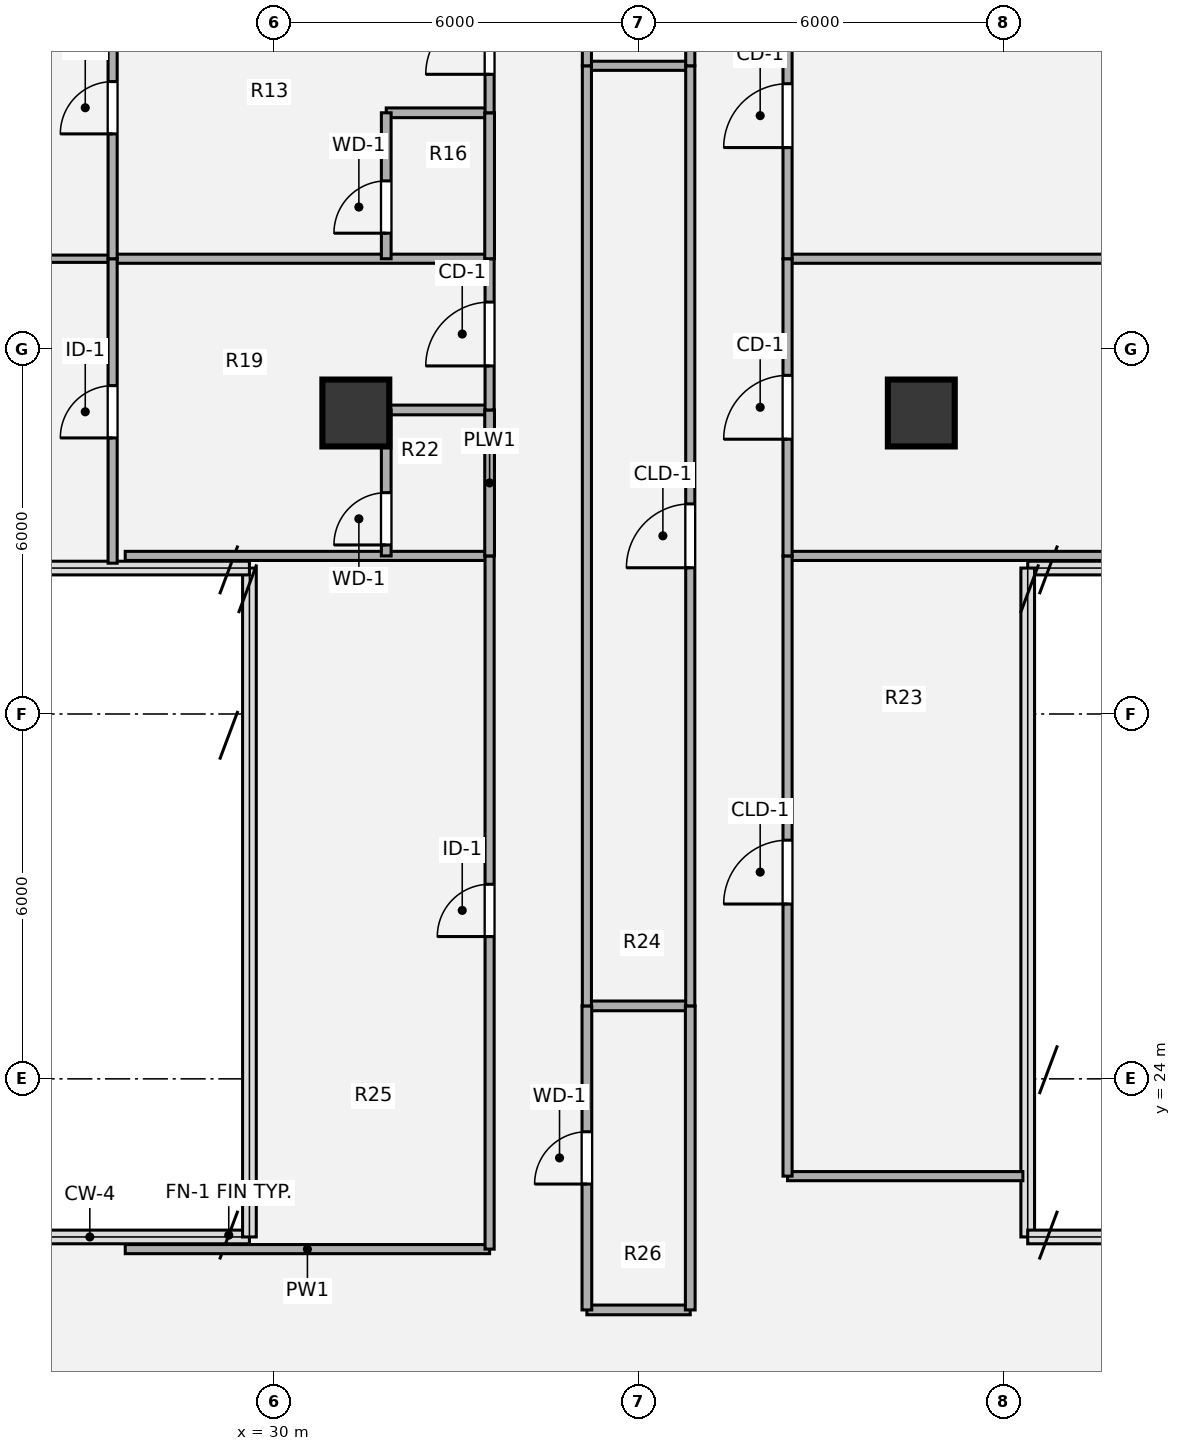
"""IFC4 building model, lengths in metres.
Left out: names, types, materials, properties, quantities, classifications, styles, units other than length and angle.
Written with IfcOpenShell. Run it as: python <this file> out.ifc"""

import sys

from ifc_helpers import new_model, si_unit, direction, frame, frame_2d, origin, origin_2d, place, context, subcontext, project, spatial, rectangle, hollow_circle, extrude, source, transform, mapped, element, fill, save


model = new_model("IFC4")
c1 = context("Model", 3, precision=1e-05, world=origin(), true_north=direction((0.0, 1.0)))
c2 = subcontext(c1, "Body", "Model", "MODEL_VIEW")
j1 = project(units=[si_unit("LENGTHUNIT", "METRE"), si_unit("PLANEANGLEUNIT", "RADIAN")], contexts=[c1])
p1 = place(None, origin())
s1 = spatial("IfcSite", under=j1, at=p1, CompositionType="ELEMENT")
p2 = place(p1, origin())
s2 = spatial("IfcBuilding", under=s1, at=p2, CompositionType="ELEMENT")
p3 = place(p2, frame((0.0, 0.0, 198.0)))
s3 = spatial("IfcBuildingStorey", under=s2, at=p3, CompositionType="ELEMENT", Elevation=198.0)
m1 = source(origin(), c2, "Body", "SweptSolid", [
    extrude(hollow_circle(Radius=0.55, WallThickness=0.04, at=origin_2d()), origin(), (0.0, 0.0, 1.0), 3.78),
])
for number, where, z_axis, x_axis in (
    (1, (31.35, 34.95, 0.0), (0.0, 0.0, 1.0), (1.0, 0.0, 0.0)),
    (2, (40.65, 34.95, 0.0), (0.0, 0.0, 1.0), (1.0, 0.0, 0.0)),
):
    element("IfcColumn", number, at=place(p3, frame(where, z_axis=z_axis, x_axis=x_axis)), inside=s3, PredefinedType="COLUMN", context=c2, shape_type="MappedRepresentation", body=[
        mapped(m1, transform((0.0, 0.0, 0.0), x_axis=(1.0, 0.0, 0.0), y_axis=(0.0, 1.0, 0.0), z_axis=(0.0, 0.0, 1.0), scale=1.0)),
    ])
p4 = place(p3, frame((35.15, 20.2, 0.0), z_axis=(0.0, 0.0, 1.0), x_axis=(1.0, 0.0, 0.0)))
e3 = element("IfcWall", 3, at=p4, inside=s3, PredefinedType="PLUMBINGWALL", context=c2, shape_type="SweptSolid", body=[
    extrude(rectangle(XDim=1.7, YDim=0.16, at=frame_2d((0.85, 0.0))), origin(), (0.0, 0.0, 1.0), 3.5),
])
p5 = place(p3, frame((27.558, 21.2, 0.0), z_axis=(0.0, 0.0, 1.0), x_axis=(1.0, 0.0, 0.0)))
e4 = element("IfcWall", 4, at=p5, inside=s3, PredefinedType="PARTITIONING", context=c2, shape_type="SweptSolid", body=[
    extrude(rectangle(XDim=5.992, YDim=0.15, at=frame_2d((2.996, 0.0))), origin(), (0.0, 0.0, 1.0), 3.5),
])
p6 = place(p3, frame((38.45, 22.4, 0.0), z_axis=(0.0, 0.0, 1.0), x_axis=(1.0, 0.0, 0.0)))
e5 = element("IfcWall", 5, at=p6, inside=s3, PredefinedType="PARTITIONING", context=c2, shape_type="SweptSolid", body=[
    extrude(rectangle(XDim=3.87, YDim=0.15, at=frame_2d((1.935, 0.0))), origin(), (0.0, 0.0, 1.0), 3.5),
])
p7 = place(p3, frame((35.15, 25.2, 0.0), z_axis=(0.0, 0.0, 1.0), x_axis=(1.0, 0.0, 0.0)))
e6 = element("IfcWall", 6, at=p7, inside=s3, PredefinedType="PLUMBINGWALL", context=c2, shape_type="SweptSolid", body=[
    extrude(rectangle(XDim=1.7, YDim=0.16, at=frame_2d((0.85, 0.0))), origin(), (0.0, 0.0, 1.0), 3.5),
])
p8 = place(p3, frame((27.557, 32.6, 0.0), z_axis=(0.0, 0.0, 1.0), x_axis=(1.0, 0.0, 0.0)))
e7 = element("IfcWall", 7, at=p8, inside=s3, PredefinedType="PARTITIONING", context=c2, shape_type="SweptSolid", body=[
    extrude(rectangle(XDim=5.993, YDim=0.15, at=frame_2d((2.997, 0.0))), origin(), (0.0, 0.0, 1.0), 3.5),
])
p9 = place(p3, frame((38.45, 32.6, 0.0), z_axis=(0.0, 0.0, 1.0), x_axis=(1.0, 0.0, 0.0)))
e8 = element("IfcWall", 8, at=p9, inside=s3, PredefinedType="PARTITIONING", context=c2, shape_type="SweptSolid", body=[
    extrude(rectangle(XDim=5.993, YDim=0.15, at=frame_2d((2.997, 0.0))), origin(), (0.0, 0.0, 1.0), 3.5),
])
p10 = place(p3, frame((31.85, 35.0, 0.0), z_axis=(0.0, 0.0, 1.0), x_axis=(1.0, 0.0, 0.0)))
e9 = element("IfcWall", 9, at=p10, inside=s3, PredefinedType="PLUMBINGWALL", context=c2, shape_type="SweptSolid", body=[
    extrude(rectangle(XDim=1.7, YDim=0.16, at=frame_2d((0.85, 0.0))), origin(), (0.0, 0.0, 1.0), 2.903),
])
p11 = place(p3, frame((15.88, 37.487, 0.0), z_axis=(0.0, 0.0, 1.0), x_axis=(1.0, 0.0, 0.0)))
e10 = element("IfcWall", 10, at=p11, inside=s3, PredefinedType="PARTITIONING", context=c2, shape_type="SweptSolid", body=[
    extrude(rectangle(XDim=11.47, YDim=0.12, at=frame_2d((5.735, 0.0))), origin(), (0.0, 0.0, 1.0), 3.055),
])
p12 = place(p3, frame((27.35, 37.487, 0.0), z_axis=(0.0, 0.0, 1.0), x_axis=(1.0, 0.0, 0.0)))
e11 = element("IfcWall", 11, at=p12, inside=s3, PredefinedType="PARTITIONING", context=c2, shape_type="SweptSolid", body=[
    extrude(rectangle(XDim=6.2, YDim=0.15, at=frame_2d((3.1, 0.0))), origin(), (0.0, 0.0, 1.0), 3.055),
])
p13 = place(p3, frame((38.45, 37.487, 0.0), z_axis=(0.0, 0.0, 1.0), x_axis=(1.0, 0.0, 0.0)))
e12 = element("IfcWall", 12, at=p13, inside=s3, PredefinedType="PARTITIONING", context=c2, shape_type="SweptSolid", body=[
    extrude(rectangle(XDim=17.67, YDim=0.15, at=frame_2d((8.835, 0.0))), origin(), (0.0, 0.0, 1.0), 3.055),
])
p14 = place(p3, frame((31.85, 39.887, 0.0), z_axis=(0.0, 0.0, 1.0), x_axis=(1.0, 0.0, 0.0)))
e13 = element("IfcWall", 13, at=p14, inside=s3, PredefinedType="PLUMBINGWALL", context=c2, shape_type="SweptSolid", body=[
    extrude(rectangle(XDim=1.7, YDim=0.16, at=frame_2d((0.85, 0.0))), origin(), (0.0, 0.0, 1.0), 3.259),
])
p15 = place(p3, frame((35.15, 40.66, 0.0), z_axis=(0.0, 0.0, 1.0), x_axis=(1.0, 0.0, 0.0)))
e14 = element("IfcWall", 14, at=p15, inside=s3, PredefinedType="PARTITIONING", context=c2, shape_type="SweptSolid", body=[
    extrude(rectangle(XDim=1.7, YDim=0.15, at=frame_2d((0.85, 0.0))), origin(), (0.0, 0.0, 1.0), 3.259),
])
p16 = place(p3, frame((27.35, 32.48, 0.0), z_axis=(0.0, 0.0, 1.0), x_axis=(0.0, 1.0, 0.0)))
e15 = element("IfcWall", 15, at=p16, inside=s3, PredefinedType="PARTITIONING", context=c2, shape_type="SweptSolid", body=[
    extrude(rectangle(XDim=5.007, YDim=0.15, at=frame_2d((2.503, 0.0))), origin(), (0.0, 0.0, 1.0), 3.5),
])
p17 = place(p16, frame((2.06, 0.0, 0.0)))
e16 = element("IfcOpeningElement", 16, at=p17, cuts=e15, PredefinedType="OPENING", context=c2, shape_type="SweptSolid", body=[
    extrude(rectangle(XDim=0.86, YDim=2.1, at=origin_2d()), frame((0.43, 0.085, 1.05), z_axis=(0.0, -1.0, 0.0), x_axis=(1.0, 0.0, 0.0)), (0.0, 0.0, 1.0), 0.17),
])
p18 = place(p3, frame((27.35, 37.487, 0.0), z_axis=(0.0, 0.0, 1.0), x_axis=(0.0, 1.0, 0.0)))
e17 = element("IfcWall", 17, at=p18, inside=s3, PredefinedType="PARTITIONING", context=c2, shape_type="SweptSolid", body=[
    extrude(rectangle(XDim=4.706, YDim=0.15, at=frame_2d((2.353, 0.0))), origin(), (0.0, 0.0, 1.0), 3.5),
])
p19 = place(p18, frame((2.053, 0.0, 0.0)))
e18 = element("IfcOpeningElement", 18, at=p19, cuts=e17, PredefinedType="OPENING", context=c2, shape_type="SweptSolid", body=[
    extrude(rectangle(XDim=0.86, YDim=2.1, at=origin_2d()), frame((0.43, 0.085, 1.05), z_axis=(0.0, -1.0, 0.0), x_axis=(1.0, 0.0, 0.0)), (0.0, 0.0, 1.0), 0.17),
])
p20 = place(p3, frame((31.85, 32.6, 0.0), z_axis=(0.0, 0.0, 1.0), x_axis=(0.0, 1.0, 0.0)))
e19 = element("IfcWall", 19, at=p20, inside=s3, PredefinedType="PLUMBINGWALL", context=c2, shape_type="SweptSolid", body=[
    extrude(rectangle(XDim=2.4, YDim=0.16, at=frame_2d((1.2, 0.0))), origin(), (0.0, 0.0, 1.0), 3.5),
])
p21 = place(p20, frame((0.18, 0.0, 0.0)))
e20 = element("IfcOpeningElement", 20, at=p21, cuts=e19, PredefinedType="OPENING", context=c2, shape_type="SweptSolid", body=[
    extrude(rectangle(XDim=0.86, YDim=2.1, at=origin_2d()), frame((0.43, 0.09, 1.05), z_axis=(0.0, -1.0, 0.0), x_axis=(1.0, 0.0, 0.0)), (0.0, 0.0, 1.0), 0.18),
])
p22 = place(p3, frame((31.85, 37.487, 0.0), z_axis=(0.0, 0.0, 1.0), x_axis=(0.0, 1.0, 0.0)))
e21 = element("IfcWall", 21, at=p22, inside=s3, PredefinedType="PLUMBINGWALL", context=c2, shape_type="SweptSolid", body=[
    extrude(rectangle(XDim=2.4, YDim=0.16, at=frame_2d((1.2, 0.0))), origin(), (0.0, 0.0, 1.0), 3.5),
])
p23 = place(p22, frame((0.42, 0.0, 0.0)))
e22 = element("IfcOpeningElement", 22, at=p23, cuts=e21, PredefinedType="OPENING", context=c2, shape_type="SweptSolid", body=[
    extrude(rectangle(XDim=0.86, YDim=2.1, at=origin_2d()), frame((0.43, 0.09, 1.05), z_axis=(0.0, -1.0, 0.0), x_axis=(1.0, 0.0, 0.0)), (0.0, 0.0, 1.0), 0.18),
])
p24 = place(p3, frame((33.55, 21.2, 0.0), z_axis=(0.0, 0.0, 1.0), x_axis=(0.0, 1.0, 0.0)))
e23 = element("IfcWall", 23, at=p24, inside=s3, PredefinedType="PARTITIONING", context=c2, shape_type="SweptSolid", body=[
    extrude(rectangle(XDim=11.4, YDim=0.15, at=frame_2d((5.7, 0.0))), origin(), (0.0, 0.0, 1.0), 3.5),
])
p25 = place(p24, frame((5.14, 0.0, 0.0)))
e24 = element("IfcOpeningElement", 24, at=p25, cuts=e23, PredefinedType="OPENING", context=c2, shape_type="SweptSolid", body=[
    extrude(rectangle(XDim=0.86, YDim=2.1, at=origin_2d()), frame((0.43, 0.085, 1.05), z_axis=(0.0, -1.0, 0.0), x_axis=(1.0, 0.0, 0.0)), (0.0, 0.0, 1.0), 0.17),
])
p26 = place(p3, frame((33.55, 32.6, 0.0), z_axis=(0.0, 0.0, 1.0), x_axis=(0.0, 1.0, 0.0)))
e25 = element("IfcWall", 25, at=p26, inside=s3, PredefinedType="PLUMBINGWALL", context=c2, shape_type="SweptSolid", body=[
    extrude(rectangle(XDim=2.4, YDim=0.16, at=frame_2d((1.2, 0.0))), origin(), (0.0, 0.0, 1.0), 3.5),
])
p27 = place(p3, frame((33.55, 35.0, 0.0), z_axis=(0.0, 0.0, 1.0), x_axis=(0.0, 1.0, 0.0)))
e26 = element("IfcWall", 26, at=p27, inside=s3, PredefinedType="PARTITIONING", context=c2, shape_type="SweptSolid", body=[
    extrude(rectangle(XDim=2.487, YDim=0.15, at=frame_2d((1.244, 0.0))), origin(), (0.0, 0.0, 1.0), 3.5),
])
p28 = place(p27, frame((0.724, 0.0, 0.0)))
e27 = element("IfcOpeningElement", 27, at=p28, cuts=e26, PredefinedType="OPENING", context=c2, shape_type="SweptSolid", body=[
    extrude(rectangle(XDim=1.05, YDim=2.1, at=origin_2d()), frame((0.525, 0.085, 1.05), z_axis=(0.0, -1.0, 0.0), x_axis=(1.0, 0.0, 0.0)), (0.0, 0.0, 1.0), 0.17),
])
p29 = place(p3, frame((33.55, 37.487, 0.0), z_axis=(0.0, 0.0, 1.0), x_axis=(0.0, 1.0, 0.0)))
e28 = element("IfcWall", 28, at=p29, inside=s3, PredefinedType="PLUMBINGWALL", context=c2, shape_type="SweptSolid", body=[
    extrude(rectangle(XDim=2.4, YDim=0.16, at=frame_2d((1.2, 0.0))), origin(), (0.0, 0.0, 1.0), 3.5),
])
p30 = place(p3, frame((33.55, 39.887, 0.0), z_axis=(0.0, 0.0, 1.0), x_axis=(0.0, 1.0, 0.0)))
e29 = element("IfcWall", 29, at=p30, inside=s3, PredefinedType="PARTITIONING", context=c2, shape_type="SweptSolid", body=[
    extrude(rectangle(XDim=2.306, YDim=0.15, at=frame_2d((1.153, 0.0))), origin(), (0.0, 0.0, 1.0), 3.5),
])
p31 = place(p30, frame((0.633, 0.0, 0.0)))
e30 = element("IfcOpeningElement", 30, at=p31, cuts=e29, PredefinedType="OPENING", context=c2, shape_type="SweptSolid", body=[
    extrude(rectangle(XDim=1.05, YDim=2.1, at=origin_2d()), frame((0.525, 0.085, 1.05), z_axis=(0.0, -1.0, 0.0), x_axis=(1.0, 0.0, 0.0)), (0.0, 0.0, 1.0), 0.17),
])
p32 = place(p3, frame((35.15, 20.2, 0.0), z_axis=(0.0, 0.0, 1.0), x_axis=(0.0, 1.0, 0.0)))
e31 = element("IfcWall", 31, at=p32, inside=s3, PredefinedType="PLUMBINGWALL", context=c2, shape_type="SweptSolid", body=[
    extrude(rectangle(XDim=5.0, YDim=0.16, at=frame_2d((2.5, 0.0))), origin(), (0.0, 0.0, 1.0), 3.5),
])
p33 = place(p32, frame((2.07, 0.0, 0.0)))
e32 = element("IfcOpeningElement", 32, at=p33, cuts=e31, PredefinedType="OPENING", context=c2, shape_type="SweptSolid", body=[
    extrude(rectangle(XDim=0.86, YDim=2.1, at=origin_2d()), frame((0.43, 0.09, 1.05), z_axis=(0.0, -1.0, 0.0), x_axis=(1.0, 0.0, 0.0)), (0.0, 0.0, 1.0), 0.18),
])
p34 = place(p3, frame((35.15, 25.2, 0.0), z_axis=(0.0, 0.0, 1.0), x_axis=(0.0, 1.0, 0.0)))
e33 = element("IfcWall", 33, at=p34, inside=s3, PredefinedType="PARTITIONING", context=c2, shape_type="SweptSolid", body=[
    extrude(rectangle(XDim=15.46, YDim=0.15, at=frame_2d((7.73, 0.0))), origin(), (0.0, 0.0, 1.0), 3.5),
])
p35 = place(p3, frame((35.15, 40.66, 0.0), z_axis=(0.0, 0.0, 1.0), x_axis=(0.0, 1.0, 0.0)))
e34 = element("IfcWall", 34, at=p35, inside=s3, PredefinedType="PARTITIONING", context=c2, shape_type="SweptSolid", body=[
    extrude(rectangle(XDim=10.54, YDim=0.15, at=frame_2d((5.27, 0.0))), origin(), (0.0, 0.0, 1.0), 3.5),
])
p36 = place(p35, frame((4.81, 0.0, 0.0)))
e35 = element("IfcOpeningElement", 35, at=p36, cuts=e34, PredefinedType="OPENING", context=c2, shape_type="SweptSolid", body=[
    extrude(rectangle(XDim=0.86, YDim=2.1, at=origin_2d()), frame((0.43, 0.085, 1.05), z_axis=(0.0, -1.0, 0.0), x_axis=(1.0, 0.0, 0.0)), (0.0, 0.0, 1.0), 0.17),
])
p37 = place(p3, frame((36.85, 20.2, 0.0), z_axis=(0.0, 0.0, 1.0), x_axis=(0.0, 1.0, 0.0)))
e36 = element("IfcWall", 36, at=p37, inside=s3, PredefinedType="PLUMBINGWALL", context=c2, shape_type="SweptSolid", body=[
    extrude(rectangle(XDim=5.0, YDim=0.16, at=frame_2d((2.5, 0.0))), origin(), (0.0, 0.0, 1.0), 3.5),
])
p38 = place(p3, frame((36.85, 25.2, 0.0), z_axis=(0.0, 0.0, 1.0), x_axis=(0.0, 1.0, 0.0)))
e37 = element("IfcWall", 37, at=p38, inside=s3, PredefinedType="PARTITIONING", context=c2, shape_type="SweptSolid", body=[
    extrude(rectangle(XDim=15.46, YDim=0.15, at=frame_2d((7.73, 0.0))), origin(), (0.0, 0.0, 1.0), 3.5),
])
p39 = place(p38, frame((7.205, 0.0, 0.0)))
e38 = element("IfcOpeningElement", 38, at=p39, cuts=e37, PredefinedType="OPENING", context=c2, shape_type="SweptSolid", body=[
    extrude(rectangle(XDim=1.05, YDim=2.1, at=origin_2d()), frame((0.525, 0.085, 1.05), z_axis=(0.0, -1.0, 0.0), x_axis=(1.0, 0.0, 0.0)), (0.0, 0.0, 1.0), 0.17),
])
p40 = place(p3, frame((36.85, 40.66, 0.0), z_axis=(0.0, 0.0, 1.0), x_axis=(0.0, 1.0, 0.0)))
e39 = element("IfcWall", 39, at=p40, inside=s3, PredefinedType="PARTITIONING", context=c2, shape_type="SweptSolid", body=[
    extrude(rectangle(XDim=10.54, YDim=0.15, at=frame_2d((5.27, 0.0))), origin(), (0.0, 0.0, 1.0), 3.5),
])
p41 = place(p3, frame((38.45, 22.4, 0.0), z_axis=(0.0, 0.0, 1.0), x_axis=(0.0, 1.0, 0.0)))
e40 = element("IfcWall", 40, at=p41, inside=s3, PredefinedType="PARTITIONING", context=c2, shape_type="SweptSolid", body=[
    extrude(rectangle(XDim=10.2, YDim=0.15, at=frame_2d((5.1, 0.0))), origin(), (0.0, 0.0, 1.0), 3.5),
])
p42 = place(p41, frame((4.475, 0.0, 0.0)))
e41 = element("IfcOpeningElement", 41, at=p42, cuts=e40, PredefinedType="OPENING", context=c2, shape_type="SweptSolid", body=[
    extrude(rectangle(XDim=1.05, YDim=2.1, at=origin_2d()), frame((0.525, 0.085, 1.05), z_axis=(0.0, -1.0, 0.0), x_axis=(1.0, 0.0, 0.0)), (0.0, 0.0, 1.0), 0.17),
])
p43 = place(p3, frame((38.45, 32.6, 0.0), z_axis=(0.0, 0.0, 1.0), x_axis=(0.0, 1.0, 0.0)))
e42 = element("IfcWall", 42, at=p43, inside=s3, PredefinedType="PARTITIONING", context=c2, shape_type="SweptSolid", body=[
    extrude(rectangle(XDim=4.887, YDim=0.15, at=frame_2d((2.443, 0.0))), origin(), (0.0, 0.0, 1.0), 3.5),
])
p44 = place(p43, frame((1.919, 0.0, 0.0)))
e43 = element("IfcOpeningElement", 43, at=p44, cuts=e42, PredefinedType="OPENING", context=c2, shape_type="SweptSolid", body=[
    extrude(rectangle(XDim=1.05, YDim=2.1, at=origin_2d()), frame((0.525, 0.085, 1.05), z_axis=(0.0, -1.0, 0.0), x_axis=(1.0, 0.0, 0.0)), (0.0, 0.0, 1.0), 0.17),
])
p45 = place(p3, frame((38.45, 37.487, 0.0), z_axis=(0.0, 0.0, 1.0), x_axis=(0.0, 1.0, 0.0)))
e44 = element("IfcWall", 44, at=p45, inside=s3, PredefinedType="PARTITIONING", context=c2, shape_type="SweptSolid", body=[
    extrude(rectangle(XDim=4.706, YDim=0.15, at=frame_2d((2.353, 0.0))), origin(), (0.0, 0.0, 1.0), 3.5),
])
p46 = place(p45, frame((1.828, 0.0, 0.0)))
e45 = element("IfcOpeningElement", 45, at=p46, cuts=e44, PredefinedType="OPENING", context=c2, shape_type="SweptSolid", body=[
    extrude(rectangle(XDim=1.05, YDim=2.1, at=origin_2d()), frame((0.525, 0.085, 1.05), z_axis=(0.0, -1.0, 0.0), x_axis=(1.0, 0.0, 0.0)), (0.0, 0.0, 1.0), 0.17),
])
m2 = source(origin(), c2, "Body", "SweptSolid", [
    extrude(rectangle(XDim=0.86, YDim=2.1, at=origin_2d()), frame((0.43, 0.025, 1.05), z_axis=(0.0, -1.0, 0.0), x_axis=(1.0, 0.0, 0.0)), (0.0, 0.0, 1.0), 0.05),
])
p47 = place(p17, origin())
e46 = element("IfcDoor", 46, at=p47, inside=s3, OperationType="SINGLE_SWING_LEFT", PredefinedType="DOOR", context=c2, shape_type="MappedRepresentation", body=[
    mapped(m2, transform((0.0, 0.0, 0.0), x_axis=(1.0, 0.0, 0.0), y_axis=(0.0, 1.0, 0.0), z_axis=(0.0, 0.0, 1.0), scale=1.0)),
])
fill(e16, e46)
p48 = place(p19, origin())
e47 = element("IfcDoor", 47, at=p48, inside=s3, OperationType="SINGLE_SWING_LEFT", PredefinedType="DOOR", context=c2, shape_type="MappedRepresentation", body=[
    mapped(m2, transform((0.0, 0.0, 0.0), x_axis=(1.0, 0.0, 0.0), y_axis=(0.0, 1.0, 0.0), z_axis=(0.0, 0.0, 1.0), scale=1.0)),
])
fill(e18, e47)
m3 = source(origin(), c2, "Body", "SweptSolid", [
    extrude(rectangle(XDim=0.86, YDim=2.1, at=origin_2d()), frame((0.43, 0.025, 1.05), z_axis=(0.0, -1.0, 0.0), x_axis=(1.0, 0.0, 0.0)), (0.0, 0.0, 1.0), 0.05),
])
p49 = place(p21, origin())
e48 = element("IfcDoor", 48, at=p49, inside=s3, OperationType="SINGLE_SWING_LEFT", PredefinedType="DOOR", context=c2, shape_type="MappedRepresentation", body=[
    mapped(m3, transform((0.0, 0.0, 0.0), x_axis=(1.0, 0.0, 0.0), y_axis=(0.0, 1.0, 0.0), z_axis=(0.0, 0.0, 1.0), scale=1.0)),
])
fill(e20, e48)
p50 = place(p23, origin())
e49 = element("IfcDoor", 49, at=p50, inside=s3, OperationType="SINGLE_SWING_LEFT", PredefinedType="DOOR", context=c2, shape_type="MappedRepresentation", body=[
    mapped(m3, transform((0.0, 0.0, 0.0), x_axis=(1.0, 0.0, 0.0), y_axis=(0.0, 1.0, 0.0), z_axis=(0.0, 0.0, 1.0), scale=1.0)),
])
fill(e22, e49)
p51 = place(p25, origin())
e50 = element("IfcDoor", 50, at=p51, inside=s3, OperationType="SINGLE_SWING_LEFT", PredefinedType="DOOR", context=c2, shape_type="MappedRepresentation", body=[
    mapped(m2, transform((0.0, 0.0, 0.0), x_axis=(1.0, 0.0, 0.0), y_axis=(0.0, 1.0, 0.0), z_axis=(0.0, 0.0, 1.0), scale=1.0)),
])
fill(e24, e50)
m4 = source(origin(), c2, "Body", "SweptSolid", [
    extrude(rectangle(XDim=1.05, YDim=2.1, at=origin_2d()), frame((0.525, 0.025, 1.05), z_axis=(0.0, -1.0, 0.0), x_axis=(1.0, 0.0, 0.0)), (0.0, 0.0, 1.0), 0.05),
])
p52 = place(p28, origin())
e51 = element("IfcDoor", 51, at=p52, inside=s3, OperationType="SINGLE_SWING_LEFT", PredefinedType="DOOR", context=c2, shape_type="MappedRepresentation", body=[
    mapped(m4, transform((0.0, 0.0, 0.0), x_axis=(1.0, 0.0, 0.0), y_axis=(0.0, 1.0, 0.0), z_axis=(0.0, 0.0, 1.0), scale=1.0)),
])
fill(e27, e51)
p53 = place(p31, origin())
e52 = element("IfcDoor", 52, at=p53, inside=s3, OperationType="SINGLE_SWING_LEFT", PredefinedType="DOOR", context=c2, shape_type="MappedRepresentation", body=[
    mapped(m4, transform((0.0, 0.0, 0.0), x_axis=(1.0, 0.0, 0.0), y_axis=(0.0, 1.0, 0.0), z_axis=(0.0, 0.0, 1.0), scale=1.0)),
])
fill(e30, e52)
p54 = place(p33, origin())
e53 = element("IfcDoor", 53, at=p54, inside=s3, OperationType="SINGLE_SWING_LEFT", PredefinedType="DOOR", context=c2, shape_type="MappedRepresentation", body=[
    mapped(m3, transform((0.0, 0.0, 0.0), x_axis=(1.0, 0.0, 0.0), y_axis=(0.0, 1.0, 0.0), z_axis=(0.0, 0.0, 1.0), scale=1.0)),
])
fill(e32, e53)
m5 = source(origin(), c2, "Body", "SweptSolid", [
    extrude(rectangle(XDim=1.05, YDim=2.1, at=origin_2d()), frame((0.525, 0.025, 1.05), z_axis=(0.0, -1.0, 0.0), x_axis=(1.0, 0.0, 0.0)), (0.0, 0.0, 1.0), 0.05),
])
p55 = place(p39, origin())
e54 = element("IfcDoor", 54, at=p55, inside=s3, OperationType="SINGLE_SWING_LEFT", PredefinedType="DOOR", context=c2, shape_type="MappedRepresentation", body=[
    mapped(m5, transform((0.0, 0.0, 0.0), x_axis=(1.0, 0.0, 0.0), y_axis=(0.0, 1.0, 0.0), z_axis=(0.0, 0.0, 1.0), scale=1.0)),
])
fill(e38, e54)
p56 = place(p42, origin())
e55 = element("IfcDoor", 55, at=p56, inside=s3, OperationType="SINGLE_SWING_LEFT", PredefinedType="DOOR", context=c2, shape_type="MappedRepresentation", body=[
    mapped(m5, transform((0.0, 0.0, 0.0), x_axis=(1.0, 0.0, 0.0), y_axis=(0.0, 1.0, 0.0), z_axis=(0.0, 0.0, 1.0), scale=1.0)),
])
fill(e41, e55)
p57 = place(p44, origin())
e56 = element("IfcDoor", 56, at=p57, inside=s3, OperationType="SINGLE_SWING_LEFT", PredefinedType="DOOR", context=c2, shape_type="MappedRepresentation", body=[
    mapped(m4, transform((0.0, 0.0, 0.0), x_axis=(1.0, 0.0, 0.0), y_axis=(0.0, 1.0, 0.0), z_axis=(0.0, 0.0, 1.0), scale=1.0)),
])
fill(e43, e56)
p58 = place(p46, origin())
e57 = element("IfcDoor", 57, at=p58, inside=s3, OperationType="SINGLE_SWING_LEFT", PredefinedType="DOOR", context=c2, shape_type="MappedRepresentation", body=[
    mapped(m4, transform((0.0, 0.0, 0.0), x_axis=(1.0, 0.0, 0.0), y_axis=(0.0, 1.0, 0.0), z_axis=(0.0, 0.0, 1.0), scale=1.0)),
])
fill(e45, e57)
save(model, sys.argv[1])
